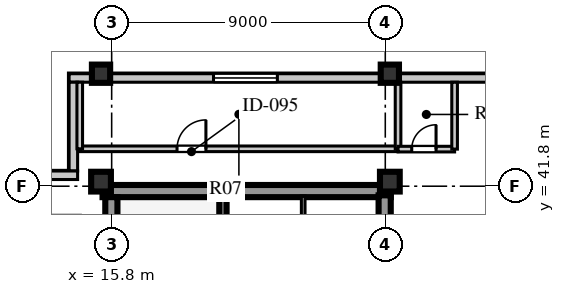
"""IFC4 building model, lengths in metres.
Left out: names, types, materials, properties, quantities, classifications, styles, units other than length and angle.
Written with IfcOpenShell. Run it as: python <this file> out.ifc"""

import sys

from ifc_helpers import new_model, si_unit, direction, frame, frame_2d, origin, origin_2d, place, context, subcontext, project, spatial, rectangle, extrude, element, fill, save


model = new_model("IFC4")
c1 = context("Model", 3, precision=1e-05, world=origin(), true_north=direction((0.0, 1.0)))
c2 = subcontext(c1, "Body", "Model", "MODEL_VIEW")
j1 = project(units=[si_unit("LENGTHUNIT", "METRE"), si_unit("PLANEANGLEUNIT", "RADIAN")], contexts=[c1])
p1 = place(None, origin())
s1 = spatial("IfcSite", under=j1, at=p1, CompositionType="ELEMENT")
p2 = place(p1, origin())
s2 = spatial("IfcBuilding", under=s1, at=p2, CompositionType="ELEMENT")
p3 = place(p2, frame((0.0, 0.0, 342.9)))
s3 = spatial("IfcBuildingStorey", under=s2, at=p3, CompositionType="ELEMENT", Elevation=342.9)
p4 = place(p3, frame((15.5, 41.64, 0.0), z_axis=(0.0, 0.0, 1.0), x_axis=(1.0, 0.0, 0.0)))
e1 = element("IfcWall", 1, at=p4, inside=s3, PredefinedType="SHEAR", context=c2, shape_type="SweptSolid", body=[
    extrude(rectangle(XDim=9.48, YDim=0.4, at=frame_2d((4.74, 0.0))), origin(), (0.0, 0.0, 1.0), 3.55),
])
p5 = place(p3, frame((15.79, 15.81, 0.0), z_axis=(0.0, 0.0, 1.0), x_axis=(0.0, 1.0, 0.0)))
e2 = element("IfcWall", 2, at=p5, inside=s3, PredefinedType="SHEAR", context=c2, shape_type="SweptSolid", body=[
    extrude(rectangle(XDim=25.63, YDim=0.4, at=frame_2d((12.815, 0.0))), origin(), (0.0, 0.0, 1.0), 3.55),
])
p6 = place(p3, frame((24.78, 15.74, 0.0), z_axis=(0.0, 0.0, 1.0), x_axis=(0.0, 1.0, 0.0)))
e3 = element("IfcWall", 3, at=p6, inside=s3, PredefinedType="SHEAR", context=c2, shape_type="SweptSolid", body=[
    extrude(rectangle(XDim=25.76, YDim=0.4, at=frame_2d((12.88, 0.0))), origin(), (0.0, 0.0, 1.0), 3.55),
])
p7 = place(p6, frame((1.61, 0.0, 0.0)))
e4 = element("IfcOpeningElement", 4, at=p7, cuts=e3, PredefinedType="OPENING", context=c2, shape_type="SweptSolid", body=[
    extrude(rectangle(XDim=1.2, YDim=2.1, at=frame_2d((0.6, 1.05))), frame((0.0, 0.21, 0.0), z_axis=(0.0, -1.0, 0.0), x_axis=(1.0, 0.0, 0.0)), (0.0, 0.0, 1.0), 0.42),
])
p8 = place(p6, frame((6.78, 0.0, 0.0)))
e5 = element("IfcOpeningElement", 5, at=p8, cuts=e3, PredefinedType="OPENING", context=c2, shape_type="SweptSolid", body=[
    extrude(rectangle(XDim=0.85, YDim=2.06, at=frame_2d((0.425, 1.03))), frame((0.0, 0.21, 0.0), z_axis=(0.0, -1.0, 0.0), x_axis=(1.0, 0.0, 0.0)), (0.0, 0.0, 1.0), 0.42),
])
p9 = place(p6, frame((12.11, 0.0, 0.0)))
e6 = element("IfcOpeningElement", 6, at=p9, cuts=e3, PredefinedType="OPENING", context=c2, shape_type="SweptSolid", body=[
    extrude(rectangle(XDim=1.5, YDim=2.12, at=frame_2d((0.75, 1.06))), frame((0.0, 0.21, 0.0), z_axis=(0.0, -1.0, 0.0), x_axis=(1.0, 0.0, 0.0)), (0.0, 0.0, 1.0), 0.42),
])
p10 = place(p6, frame((20.11, 0.0, 0.0)))
e7 = element("IfcOpeningElement", 7, at=p10, cuts=e3, PredefinedType="OPENING", context=c2, shape_type="SweptSolid", body=[
    extrude(rectangle(XDim=1.2, YDim=2.12, at=frame_2d((0.6, 1.06))), frame((0.0, 0.21, 0.0), z_axis=(0.0, -1.0, 0.0), x_axis=(1.0, 0.0, 0.0)), (0.0, 0.0, 1.0), 0.42),
])
p11 = place(p6, frame((24.01, 0.0, 0.0)))
e8 = element("IfcOpeningElement", 8, at=p11, cuts=e3, PredefinedType="OPENING", context=c2, shape_type="SweptSolid", body=[
    extrude(rectangle(XDim=0.95, YDim=2.1, at=frame_2d((0.475, 1.05))), frame((0.0, 0.21, 0.0), z_axis=(0.0, -1.0, 0.0), x_axis=(1.0, 0.0, 0.0)), (0.0, 0.0, 1.0), 0.42),
])
for number, where, z_axis, x_axis in (
    (9, (15.45, 41.95, 0.0), (0.0, 0.0, 1.0), (1.0, 0.0, 0.0)),
    (10, (24.95, 41.95, 0.0), (0.0, 0.0, 1.0), (1.0, 0.0, 0.0)),
):
    element("IfcColumn", number, at=place(p3, frame(where, z_axis=z_axis, x_axis=x_axis)), inside=s3, PredefinedType="COLUMN", context=c2, shape_type="SweptSolid", body=[
        extrude(rectangle(XDim=0.65, YDim=0.65, at=origin_2d()), origin(), (0.0, 0.0, 1.0), 3.55),
    ])
for number, where, z_axis, x_axis in (
    (11, (15.45, 45.5, 0.0), (0.0, 0.0, 1.0), (1.0, 0.0, 0.0)),
    (12, (24.95, 45.5, 0.0), (0.0, 0.0, 1.0), (1.0, 0.0, 0.0)),
):
    element("IfcColumn", number, at=place(p3, frame(where, z_axis=z_axis, x_axis=x_axis)), inside=s3, PredefinedType="COLUMN", context=c2, shape_type="SweptSolid", body=[
        extrude(rectangle(XDim=0.6, YDim=0.6, at=origin_2d()), origin(), (0.0, 0.0, 1.0), 3.55),
    ])
p12 = place(p3, frame((39.6, 45.36, 0.0), z_axis=(0.0, 0.0, 1.0), x_axis=(-1.0, 0.0, 0.0)))
e13 = element("IfcWall", 13, at=p12, inside=s3, PredefinedType="STANDARD", context=c2, shape_type="SweptSolid", body=[
    extrude(rectangle(XDim=25.2, YDim=0.28, at=frame_2d((12.6, 0.0))), origin(), (0.0, 0.0, 1.0), 2.91),
])
p13 = place(p12, frame((18.35, 0.0, 0.8)))
e14 = element("IfcOpeningElement", 14, at=p13, cuts=e13, PredefinedType="OPENING", context=c2, shape_type="SweptSolid", body=[
    extrude(rectangle(XDim=2.1, YDim=1.95, at=frame_2d((1.05, 0.975))), frame((0.0, 0.15, 0.0), z_axis=(0.0, -1.0, 0.0), x_axis=(1.0, 0.0, 0.0)), (0.0, 0.0, 1.0), 0.3),
])
p14 = place(p12, frame((9.935, 0.0, 0.8)))
e15 = element("IfcOpeningElement", 15, at=p14, cuts=e13, PredefinedType="OPENING", context=c2, shape_type="SweptSolid", body=[
    extrude(rectangle(XDim=1.35, YDim=1.9, at=frame_2d((0.675, 0.95))), frame((0.0, 0.15, 0.0), z_axis=(0.0, -1.0, 0.0), x_axis=(1.0, 0.0, 0.0)), (0.0, 0.0, 1.0), 0.3),
])
p15 = place(p12, frame((6.65, 0.0, 0.8)))
e16 = element("IfcOpeningElement", 16, at=p15, cuts=e13, PredefinedType="OPENING", context=c2, shape_type="SweptSolid", body=[
    extrude(rectangle(XDim=1.2, YDim=1.75, at=frame_2d((0.6, 0.875))), frame((0.0, 0.15, 0.0), z_axis=(0.0, -1.0, 0.0), x_axis=(1.0, 0.0, 0.0)), (0.0, 0.0, 1.0), 0.3),
])
p16 = place(p12, frame((1.4, 0.0, 0.8)))
e17 = element("IfcOpeningElement", 17, at=p16, cuts=e13, PredefinedType="OPENING", context=c2, shape_type="SweptSolid", body=[
    extrude(rectangle(XDim=1.95, YDim=2.0, at=frame_2d((0.975, 1.0))), frame((0.0, 0.15, 0.0), z_axis=(0.0, -1.0, 0.0), x_axis=(1.0, 0.0, 0.0)), (0.0, 0.0, 1.0), 0.3),
])
p17 = place(p3, frame((14.54, 45.22, 0.0), z_axis=(0.0, 0.0, 1.0), x_axis=(0.0, -1.0, 0.0)))
e18 = element("IfcWall", 18, at=p17, inside=s3, PredefinedType="STANDARD", context=c2, shape_type="SweptSolid", body=[
    extrude(rectangle(XDim=2.92, YDim=0.28, at=frame_2d((1.46, 0.0))), origin(), (0.0, 0.0, 1.0), 2.91),
])
p18 = place(p3, frame((14.68, 42.16, 0.0), z_axis=(0.0, 0.0, 1.0), x_axis=(-1.0, 0.0, 0.0)))
e19 = element("IfcWall", 19, at=p18, inside=s3, PredefinedType="STANDARD", context=c2, shape_type="SweptSolid", body=[
    extrude(rectangle(XDim=3.48, YDim=0.28, at=frame_2d((1.74, 0.0))), origin(), (0.0, 0.0, 1.0), 2.91),
])
p19 = place(p3, frame((19.46, 33.3, 0.0), z_axis=(0.0, 0.0, 1.0), x_axis=(0.0, 1.0, 0.0)))
e20 = element("IfcWall", 20, at=p19, inside=s3, PredefinedType="SHEAR", context=c2, shape_type="SweptSolid", body=[
    extrude(rectangle(XDim=8.18, YDim=0.24, at=frame_2d((4.09, 0.0))), origin(), (0.0, 0.0, 1.0), 3.8),
])
p20 = place(p19, frame((0.65, 0.0, 0.0)))
e21 = element("IfcOpeningElement", 21, at=p20, cuts=e20, PredefinedType="OPENING", context=c2, shape_type="SweptSolid", body=[
    extrude(rectangle(XDim=1.1, YDim=2.1, at=frame_2d((0.55, 1.05))), frame((0.0, 0.13, 0.0), z_axis=(0.0, -1.0, 0.0), x_axis=(1.0, 0.0, 0.0)), (0.0, 0.0, 1.0), 0.26),
])
p21 = place(p3, frame((22.1, 39.4, 0.0), z_axis=(0.0, 0.0, 1.0), x_axis=(0.0, 1.0, 0.0)))
e22 = element("IfcWall", 22, at=p21, inside=s3, PredefinedType="PARTITIONING", context=c2, shape_type="SweptSolid", body=[
    extrude(rectangle(XDim=2.08, YDim=0.12, at=frame_2d((1.04, 0.0))), origin(), (0.0, 0.0, 1.0), 3.55),
])
p22 = place(p21, frame((0.55, 0.0, 0.0)))
e23 = element("IfcOpeningElement", 23, at=p22, cuts=e22, PredefinedType="OPENING", context=c2, shape_type="SweptSolid", body=[
    extrude(rectangle(XDim=0.85, YDim=2.06, at=frame_2d((0.425, 1.03))), frame((0.0, 0.07, 0.0), z_axis=(0.0, -1.0, 0.0), x_axis=(1.0, 0.0, 0.0)), (0.0, 0.0, 1.0), 0.14),
])
p23 = place(p3, frame((14.75, 43.03, 0.0), z_axis=(0.0, 0.0, 1.0), x_axis=(1.0, 0.0, 0.0)))
e24 = element("IfcWall", 24, at=p23, inside=s3, PredefinedType="SOLIDWALL", context=c2, shape_type="SweptSolid", body=[
    extrude(rectangle(XDim=10.47, YDim=0.185, at=frame_2d((5.235, 0.0))), origin(), (0.0, 0.0, 1.0), 3.55),
])
p24 = place(p23, frame((3.2, 0.0, 0.0)))
e25 = element("IfcOpeningElement", 25, at=p24, cuts=e24, PredefinedType="OPENING", context=c2, shape_type="SweptSolid", body=[
    extrude(rectangle(XDim=0.95, YDim=2.08, at=frame_2d((0.475, 1.04))), frame((0.0, 0.103, 0.0), z_axis=(0.0, -1.0, 0.0), x_axis=(1.0, 0.0, 0.0)), (0.0, 0.0, 1.0), 0.205),
])
p25 = place(p3, frame((14.75, 43.03, 0.0), z_axis=(0.0, 0.0, 1.0), x_axis=(0.0, 1.0, 0.0)))
e26 = element("IfcWall", 26, at=p25, inside=s3, PredefinedType="SOLIDWALL", context=c2, shape_type="SweptSolid", body=[
    extrude(rectangle(XDim=2.19, YDim=0.185, at=frame_2d((1.095, 0.0))), origin(), (0.0, 0.0, 1.0), 3.55),
])
p26 = place(p3, frame((25.22, 43.03, 0.0), z_axis=(0.0, 0.0, 1.0), x_axis=(0.0, 1.0, 0.0)))
e27 = element("IfcWall", 27, at=p26, inside=s3, PredefinedType="SOLIDWALL", context=c2, shape_type="SweptSolid", body=[
    extrude(rectangle(XDim=2.19, YDim=0.185, at=frame_2d((1.095, 0.0))), origin(), (0.0, 0.0, 1.0), 3.1),
])
p27 = place(p3, frame((25.22, 43.02, 0.0), z_axis=(0.0, 0.0, 1.0), x_axis=(1.0, 0.0, 0.0)))
e28 = element("IfcWall", 28, at=p27, inside=s3, PredefinedType="SOLIDWALL", context=c2, shape_type="SweptSolid", body=[
    extrude(rectangle(XDim=1.86, YDim=0.185, at=frame_2d((0.93, 0.0))), origin(), (0.0, 0.0, 1.0), 3.55),
])
p28 = place(p27, frame((0.45, 0.0, 0.0)))
e29 = element("IfcOpeningElement", 29, at=p28, cuts=e28, PredefinedType="OPENING", context=c2, shape_type="SweptSolid", body=[
    extrude(rectangle(XDim=0.8, YDim=2.05, at=frame_2d((0.4, 1.025))), frame((0.0, 0.103, 0.0), z_axis=(0.0, -1.0, 0.0), x_axis=(1.0, 0.0, 0.0)), (0.0, 0.0, 1.0), 0.205),
])
p29 = place(p3, frame((27.08, 43.02, 0.0), z_axis=(0.0, 0.0, 1.0), x_axis=(0.0, 1.0, 0.0)))
e30 = element("IfcWall", 30, at=p29, inside=s3, PredefinedType="SOLIDWALL", context=c2, shape_type="SweptSolid", body=[
    extrude(rectangle(XDim=2.2, YDim=0.185, at=frame_2d((1.1, 0.0))), origin(), (0.0, 0.0, 1.0), 3.55),
])
p30 = place(p13, origin())
e31 = element("IfcWindow", 31, at=p30, inside=s3, PartitioningType="SINGLE_PANEL", PredefinedType="WINDOW", context=c2, shape_type="SweptSolid", body=[
    extrude(rectangle(XDim=2.1, YDim=1.95, at=frame_2d((1.05, 0.975))), frame((0.0, 0.03, 0.0), z_axis=(0.0, -1.0, 0.0), x_axis=(1.0, 0.0, 0.0)), (0.0, 0.0, 1.0), 0.06),
])
fill(e14, e31)
p31 = place(p24, origin())
e32 = element("IfcDoor", 32, at=p31, inside=s3, OperationType="SINGLE_SWING_RIGHT", PredefinedType="DOOR", context=c2, shape_type="SweptSolid", body=[
    extrude(rectangle(XDim=0.95, YDim=2.08, at=frame_2d((0.475, 1.04))), frame((0.0, 0.025, 0.0), z_axis=(0.0, -1.0, 0.0), x_axis=(1.0, 0.0, 0.0)), (0.0, 0.0, 1.0), 0.05),
])
fill(e25, e32)
p32 = place(p28, frame((0.8, 0.0, 0.0), z_axis=(0.0, 0.0, 1.0), x_axis=(-1.0, 0.0, 0.0)))
e33 = element("IfcDoor", 33, at=p32, inside=s3, OperationType="SINGLE_SWING_LEFT", PredefinedType="DOOR", context=c2, shape_type="SweptSolid", body=[
    extrude(rectangle(XDim=0.8, YDim=2.05, at=frame_2d((0.4, 1.025))), frame((0.0, 0.025, 0.0), z_axis=(0.0, -1.0, 0.0), x_axis=(1.0, 0.0, 0.0)), (0.0, 0.0, 1.0), 0.05),
])
fill(e29, e33)
save(model, sys.argv[1])
